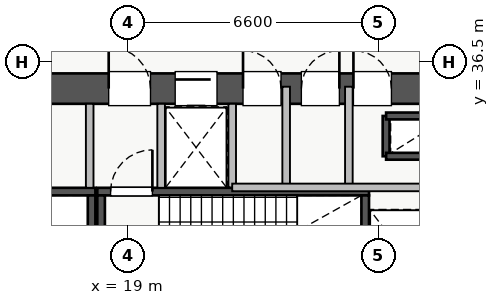
"""IFC4 building model, lengths in metres.
Left out: names, types, materials, properties, quantities, classifications, styles, units other than length and angle.
Written with IfcOpenShell. Run it as: python <this file> out.ifc"""

import sys

from ifc_helpers import new_model, si_unit, direction, frame, frame_2d, origin, place, context, subcontext, project, spatial, rectangle, extrude, source, transform, mapped, element, fill, save


model = new_model("IFC4")
c1 = context("Model", 3, precision=1e-05, world=origin(), true_north=direction((0.0, 1.0)))
c2 = subcontext(c1, "Body", "Model", "MODEL_VIEW")
j1 = project(units=[si_unit("LENGTHUNIT", "METRE"), si_unit("PLANEANGLEUNIT", "RADIAN")], contexts=[c1])
p1 = place(None, origin())
s1 = spatial("IfcSite", under=j1, at=p1, CompositionType="ELEMENT")
p2 = place(p1, origin())
s2 = spatial("IfcBuilding", under=s1, at=p2, CompositionType="ELEMENT")
p3 = place(p2, frame((0.0, 0.0, 18.2)))
s3 = spatial("IfcBuildingStorey", under=s2, at=p3, CompositionType="ELEMENT", Elevation=18.2)
p4 = place(p3, frame((25.8, 34.02, 0.0), z_axis=(0.0, 0.0, 1.0), x_axis=(0.0, 1.0, 0.0)))
e1 = element("IfcWall", 1, at=p4, inside=s3, PredefinedType="SHEAR", context=c2, shape_type="SweptSolid", body=[
    extrude(rectangle(XDim=1.06, YDim=0.18, at=frame_2d((0.53, 0.0))), origin(), (0.0, 0.0, 1.0), 4.62),
])
for number, where, z_axis, x_axis in (
    (2, (25.8, 35.08, 0.0), (0.0, 0.0, 1.0), (1.0, 0.0, 0.0)),
    (3, (25.8, 34.02, 0.0), (0.0, 0.0, 1.0), (1.0, 0.0, 0.0)),
):
    element("IfcWall", number, at=place(p3, frame(where, z_axis=z_axis, x_axis=x_axis)), inside=s3, PredefinedType="SHEAR", context=c2, shape_type="SweptSolid", body=[
        extrude(rectangle(XDim=1.2, YDim=0.18, at=frame_2d((0.6, 0.0))), origin(), (0.0, 0.0, 1.0), 4.62),
    ])
p5 = place(p3, frame((19.88, 33.2, 0.0), z_axis=(0.0, 0.0, 1.0), x_axis=(1.0, 0.0, 0.0)))
e4 = element("IfcWall", 4, at=p5, inside=s3, PredefinedType="SHEAR", context=c2, shape_type="SweptSolid", body=[
    extrude(rectangle(XDim=1.87, YDim=0.18, at=frame_2d((0.935, 0.0))), origin(), (0.0, 0.0, 1.0), 4.62),
])
p6 = place(p3, frame((11.0, 33.09, 0.0), z_axis=(0.0, 0.0, 1.0), x_axis=(1.0, 0.0, 0.0)))
e5 = element("IfcWall", 5, at=p6, inside=s3, PredefinedType="SHEAR", context=c2, shape_type="SweptSolid", body=[
    extrude(rectangle(XDim=7.15, YDim=0.2, at=frame_2d((3.575, 0.0))), origin(), (0.0, 0.0, 1.0), 4.8),
])
p7 = place(p6, frame((0.35, 0.0, 0.0)))
e6 = element("IfcOpeningElement", 6, at=p7, cuts=e5, PredefinedType="OPENING", context=c2, shape_type="SweptSolid", body=[
    extrude(rectangle(XDim=1.1, YDim=2.05, at=frame_2d((0.55, 1.025))), frame((0.0, 0.11, 0.0), z_axis=(0.0, -1.0, 0.0), x_axis=(1.0, 0.0, 0.0)), (0.0, 0.0, 1.0), 0.22),
])
p8 = place(p3, frame((18.05, 30.05, 0.0), z_axis=(0.0, 0.0, 1.0), x_axis=(0.0, 1.0, 0.0)))
e7 = element("IfcWall", 7, at=p8, inside=s3, PredefinedType="SHEAR", context=c2, shape_type="SweptSolid", body=[
    extrude(rectangle(XDim=2.94, YDim=0.2, at=frame_2d((1.47, 0.0))), origin(), (0.0, 0.0, 1.0), 4.8),
])
p9 = place(p3, frame((18.2, 33.09, 0.0), z_axis=(0.0, 0.0, 1.0), x_axis=(1.0, 0.0, 0.0)))
e8 = element("IfcWall", 8, at=p9, inside=s3, PredefinedType="SHEAR", context=c2, shape_type="SweptSolid", body=[
    extrude(rectangle(XDim=7.15, YDim=0.2, at=frame_2d((3.575, 0.0))), origin(), (0.0, 0.0, 1.0), 4.8),
])
p10 = place(p9, frame((0.35, 0.0, 0.0)))
e9 = element("IfcOpeningElement", 9, at=p10, cuts=e8, PredefinedType="OPENING", context=c2, shape_type="SweptSolid", body=[
    extrude(rectangle(XDim=1.1, YDim=2.05, at=frame_2d((0.55, 1.025))), frame((0.0, 0.11, 0.0), z_axis=(0.0, -1.0, 0.0), x_axis=(1.0, 0.0, 0.0)), (0.0, 0.0, 1.0), 0.22),
])
for number, where, z_axis, x_axis in (
    (10, (18.3, 30.05, 0.0), (0.0, 0.0, 1.0), (0.0, 1.0, 0.0)),
    (11, (25.25, 30.05, 0.0), (0.0, 0.0, 1.0), (0.0, 1.0, 0.0)),
):
    element("IfcWall", number, at=place(p3, frame(where, z_axis=z_axis, x_axis=x_axis)), inside=s3, PredefinedType="SHEAR", context=c2, shape_type="SweptSolid", body=[
        extrude(rectangle(XDim=2.94, YDim=0.2, at=frame_2d((1.47, 0.0))), origin(), (0.0, 0.0, 1.0), 4.8),
    ])
p11 = place(p3, frame((10.2, 35.8, 0.0), z_axis=(0.0, 0.0, 1.0), x_axis=(1.0, 0.0, 0.0)))
e12 = element("IfcWall", 12, at=p11, inside=s3, PredefinedType="SHEAR", context=c2, shape_type="SweptSolid", body=[
    extrude(rectangle(XDim=17.6, YDim=0.8, at=frame_2d((8.8, 0.0))), origin(), (0.0, 0.0, 1.0), 4.8),
])
p12 = place(p11, frame((1.15, 0.0, 0.0)))
e13 = element("IfcOpeningElement", 13, at=p12, cuts=e12, PredefinedType="OPENING", context=c2, shape_type="SweptSolid", body=[
    extrude(rectangle(XDim=1.1, YDim=2.05, at=frame_2d((0.55, 1.025))), frame((0.0, 0.41, 0.0), z_axis=(0.0, -1.0, 0.0), x_axis=(1.0, 0.0, 0.0)), (0.0, 0.0, 1.0), 0.82),
])
p13 = place(p11, frame((8.3, 0.0, 0.0)))
e14 = element("IfcOpeningElement", 14, at=p13, cuts=e12, PredefinedType="OPENING", context=c2, shape_type="SweptSolid", body=[
    extrude(rectangle(XDim=1.1, YDim=2.05, at=frame_2d((0.55, 1.025))), frame((0.0, 0.41, 0.0), z_axis=(0.0, -1.0, 0.0), x_axis=(1.0, 0.0, 0.0)), (0.0, 0.0, 1.0), 0.82),
])
p14 = place(p11, frame((10.05, 0.0, 0.0)))
e15 = element("IfcOpeningElement", 15, at=p14, cuts=e12, PredefinedType="OPENING", context=c2, shape_type="SweptSolid", body=[
    extrude(rectangle(XDim=1.1, YDim=2.05, at=frame_2d((0.55, 1.025))), frame((0.0, 0.41, 0.0), z_axis=(0.0, -1.0, 0.0), x_axis=(1.0, 0.0, 0.0)), (0.0, 0.0, 1.0), 0.82),
])
p15 = place(p11, frame((14.74, 0.0, 0.0)))
e16 = element("IfcOpeningElement", 16, at=p15, cuts=e12, PredefinedType="OPENING", context=c2, shape_type="SweptSolid", body=[
    extrude(rectangle(XDim=1.0, YDim=2.05, at=frame_2d((0.5, 1.025))), frame((0.0, 0.41, 0.0), z_axis=(0.0, -1.0, 0.0), x_axis=(1.0, 0.0, 0.0)), (0.0, 0.0, 1.0), 0.82),
])
p16 = place(p11, frame((11.835, 0.0, 0.0)))
e17 = element("IfcOpeningElement", 17, at=p16, cuts=e12, PredefinedType="OPENING", context=c2, shape_type="SweptSolid", body=[
    extrude(rectangle(XDim=1.0, YDim=2.05, at=frame_2d((0.5, 1.025))), frame((0.0, 0.41, 0.0), z_axis=(0.0, -1.0, 0.0), x_axis=(1.0, 0.0, 0.0)), (0.0, 0.0, 1.0), 0.82),
])
p17 = place(p11, frame((13.37, 0.0, 0.0)))
e18 = element("IfcOpeningElement", 18, at=p17, cuts=e12, PredefinedType="OPENING", context=c2, shape_type="SweptSolid", body=[
    extrude(rectangle(XDim=1.0, YDim=2.05, at=frame_2d((0.5, 1.025))), frame((0.0, 0.41, 0.0), z_axis=(0.0, -1.0, 0.0), x_axis=(1.0, 0.0, 0.0)), (0.0, 0.0, 1.0), 0.82),
])
for number, where, z_axis, x_axis in (
    (19, (18.0, 33.19, 0.0), (0.0, 0.0, 1.0), (0.0, 1.0, 0.0)),
    (20, (19.88, 33.19, 0.0), (0.0, 0.0, 1.0), (0.0, 1.0, 0.0)),
):
    element("IfcWall", number, at=place(p3, frame(where, z_axis=z_axis, x_axis=x_axis)), inside=s3, PredefinedType="PARTITIONING", context=c2, shape_type="SweptSolid", body=[
        extrude(rectangle(XDim=2.21, YDim=0.2, at=frame_2d((1.105, 0.0))), origin(), (0.0, 0.0, 1.0), 4.62),
    ])
p18 = place(p3, frame((24.82, 33.2, 0.0), z_axis=(0.0, 0.0, 1.0), x_axis=(0.0, 1.0, 0.0)))
e21 = element("IfcWall", 21, at=p18, inside=s3, PredefinedType="PARTITIONING", context=c2, shape_type="SweptSolid", body=[
    extrude(rectangle(XDim=2.65, YDim=0.2, at=frame_2d((1.325, 0.0))), origin(), (0.0, 0.0, 1.0), 4.62),
])
p19 = place(p3, frame((21.75, 33.2, 0.0), z_axis=(0.0, 0.0, 1.0), x_axis=(0.0, 1.0, 0.0)))
e22 = element("IfcWall", 22, at=p19, inside=s3, PredefinedType="PARTITIONING", context=c2, shape_type="SweptSolid", body=[
    extrude(rectangle(XDim=2.2, YDim=0.2, at=frame_2d((1.1, 0.0))), origin(), (0.0, 0.0, 1.0), 4.62),
])
p20 = place(p3, frame((23.17, 33.2, 0.0), z_axis=(0.0, 0.0, 1.0), x_axis=(0.0, 1.0, 0.0)))
e23 = element("IfcWall", 23, at=p20, inside=s3, PredefinedType="PARTITIONING", context=c2, shape_type="SweptSolid", body=[
    extrude(rectangle(XDim=2.65, YDim=0.2, at=frame_2d((1.325, 0.0))), origin(), (0.0, 0.0, 1.0), 4.62),
])
p21 = place(p3, frame((21.75, 33.2, 0.0), z_axis=(0.0, 0.0, 1.0), x_axis=(1.0, 0.0, 0.0)))
e24 = element("IfcWall", 24, at=p21, inside=s3, PredefinedType="PARTITIONING", context=c2, shape_type="SweptSolid", body=[
    extrude(rectangle(XDim=5.17, YDim=0.2, at=frame_2d((2.585, 0.0))), origin(), (0.0, 0.0, 1.0), 4.62),
])
m1 = source(origin(), c2, "Body", "SweptSolid", [
    extrude(rectangle(XDim=1.1, YDim=2.05, at=frame_2d((0.55, 1.025))), frame((0.0, 0.025, 0.0), z_axis=(0.0, -1.0, 0.0), x_axis=(1.0, 0.0, 0.0)), (0.0, 0.0, 1.0), 0.05),
])
p22 = place(p13, origin())
e25 = element("IfcDoor", 25, at=p22, inside=s3, OperationType="SINGLE_SWING_LEFT", PredefinedType="DOOR", context=c2, shape_type="MappedRepresentation", body=[
    mapped(m1, transform((0.0, 0.0, 0.0), x_axis=(1.0, 0.0, 0.0), y_axis=(0.0, 1.0, 0.0), z_axis=(0.0, 0.0, 1.0), scale=1.0)),
])
fill(e14, e25)
p23 = place(p10, origin())
e26 = element("IfcDoor", 26, at=p23, inside=s3, OperationType="SINGLE_SWING_RIGHT", PredefinedType="DOOR", context=c2, shape_type="MappedRepresentation", body=[
    mapped(m1, transform((0.0, 0.0, 0.0), x_axis=(1.0, 0.0, 0.0), y_axis=(0.0, 1.0, 0.0), z_axis=(0.0, 0.0, 1.0), scale=1.0)),
])
fill(e9, e26)
p24 = place(p14, origin())
e27 = element("IfcDoor", 27, at=p24, inside=s3, OperationType="SLIDING_TO_LEFT", PredefinedType="DOOR", context=c2, shape_type="MappedRepresentation", body=[
    mapped(m1, transform((0.0, 0.0, 0.0), x_axis=(1.0, 0.0, 0.0), y_axis=(0.0, 1.0, 0.0), z_axis=(0.0, 0.0, 1.0), scale=1.0)),
])
fill(e15, e27)
m2 = source(origin(), c2, "Body", "SweptSolid", [
    extrude(rectangle(XDim=1.0, YDim=2.05, at=frame_2d((0.5, 1.025))), frame((0.0, 0.025, 0.0), z_axis=(0.0, -1.0, 0.0), x_axis=(1.0, 0.0, 0.0)), (0.0, 0.0, 1.0), 0.05),
])
p25 = place(p15, origin())
e28 = element("IfcDoor", 28, at=p25, inside=s3, OperationType="SINGLE_SWING_LEFT", PredefinedType="DOOR", context=c2, shape_type="MappedRepresentation", body=[
    mapped(m2, transform((0.0, 0.0, 0.0), x_axis=(1.0, 0.0, 0.0), y_axis=(0.0, 1.0, 0.0), z_axis=(0.0, 0.0, 1.0), scale=1.0)),
])
fill(e16, e28)
p26 = place(p16, origin())
e29 = element("IfcDoor", 29, at=p26, inside=s3, OperationType="SINGLE_SWING_LEFT", PredefinedType="DOOR", context=c2, shape_type="MappedRepresentation", body=[
    mapped(m2, transform((0.0, 0.0, 0.0), x_axis=(1.0, 0.0, 0.0), y_axis=(0.0, 1.0, 0.0), z_axis=(0.0, 0.0, 1.0), scale=1.0)),
])
fill(e17, e29)
p27 = place(p17, origin())
e30 = element("IfcDoor", 30, at=p27, inside=s3, OperationType="SINGLE_SWING_RIGHT", PredefinedType="DOOR", context=c2, shape_type="MappedRepresentation", body=[
    mapped(m2, transform((0.0, 0.0, 0.0), x_axis=(1.0, 0.0, 0.0), y_axis=(0.0, 1.0, 0.0), z_axis=(0.0, 0.0, 1.0), scale=1.0)),
])
fill(e18, e30)
save(model, sys.argv[1])
